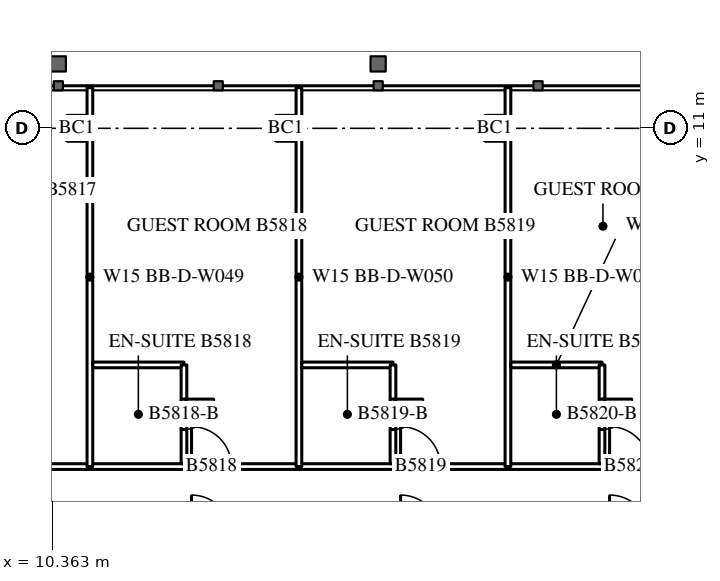
"""IFC4 building model, lengths in metres.
Left out: names, types, materials, properties, quantities, classifications, styles, units other than length and angle.
Written with IfcOpenShell. Run it as: python <this file> out.ifc"""

import sys

from ifc_helpers import new_model, si_unit, direction, frame, frame_2d, origin, origin_2d, place, context, subcontext, project, spatial, rectangle, i_section, extrude, element, fill, save


model = new_model("IFC4")
c1 = context("Model", 3, precision=1e-05, world=origin(), true_north=direction((0.0, 1.0)))
c2 = subcontext(c1, "Body", "Model", "MODEL_VIEW")
j1 = project(units=[si_unit("LENGTHUNIT", "METRE"), si_unit("PLANEANGLEUNIT", "RADIAN")], contexts=[c1])
p1 = place(None, origin())
s1 = spatial("IfcSite", under=j1, at=p1, CompositionType="ELEMENT")
p2 = place(p1, origin())
s2 = spatial("IfcBuilding", under=s1, at=p2, CompositionType="ELEMENT")
p3 = place(p2, frame((0.0, 0.0, 218.9)))
s3 = spatial("IfcBuildingStorey", under=s2, at=p3, CompositionType="ELEMENT", Elevation=218.9)
for number, where, z_axis, x_axis in (
    (1, (11.0, 11.0, 0.0), (0.0, 0.0, 1.0), (1.0, 0.0, 0.0)),
    (2, (16.5, 11.0, 0.0), (0.0, 0.0, 1.0), (1.0, 0.0, 0.0)),
    (3, (22.0, 11.0, 0.0), (0.0, 0.0, 1.0), (1.0, 0.0, 0.0)),
):
    element("IfcColumn", number, at=place(p3, frame(where, z_axis=z_axis, x_axis=x_axis)), inside=s3, PredefinedType="COLUMN", context=c2, shape_type="SweptSolid", body=[
        extrude(i_section(OverallWidth=0.476, OverallDepth=0.6, WebThickness=0.1, FlangeThickness=0.14, FilletRadius=0.02, at=origin_2d()), origin(), (0.0, 0.0, 1.0), 3.6),
    ])
p4 = place(p3, frame((-27.5, 2.1, 0.0), z_axis=(0.0, 0.0, 1.0), x_axis=(1.0, 0.0, 0.0)))
e4 = element("IfcWall", 4, at=p4, inside=s3, PredefinedType="PARTITIONING", context=c2, shape_type="SweptSolid", body=[
    extrude(rectangle(XDim=55.0, YDim=0.15, at=frame_2d((27.5, 0.0))), origin(), (0.0, 0.0, 1.0), 3.4),
])
p5 = place(p4, frame((2.025, 0.0, 0.0)))
e5 = element("IfcOpeningElement", 5, at=p5, cuts=e4, PredefinedType="OPENING", context=c2, shape_type="SweptSolid", body=[
    extrude(rectangle(XDim=1.05, YDim=2.4, at=frame_2d((0.525, 1.2))), frame((0.0, 0.085, 0.0), z_axis=(0.0, -1.0, 0.0), x_axis=(1.0, 0.0, 0.0)), (0.0, 0.0, 1.0), 0.17),
])
p6 = place(p4, frame((8.525, 0.0, 0.0)))
e6 = element("IfcOpeningElement", 6, at=p6, cuts=e4, PredefinedType="OPENING", context=c2, shape_type="SweptSolid", body=[
    extrude(rectangle(XDim=1.05, YDim=2.4, at=frame_2d((0.525, 1.2))), frame((0.0, 0.085, 0.0), z_axis=(0.0, -1.0, 0.0), x_axis=(1.0, 0.0, 0.0)), (0.0, 0.0, 1.0), 0.17),
])
p7 = place(p4, frame((14.025, 0.0, 0.0)))
e7 = element("IfcOpeningElement", 7, at=p7, cuts=e4, PredefinedType="OPENING", context=c2, shape_type="SweptSolid", body=[
    extrude(rectangle(XDim=1.05, YDim=2.4, at=frame_2d((0.525, 1.2))), frame((0.0, 0.085, 0.0), z_axis=(0.0, -1.0, 0.0), x_axis=(1.0, 0.0, 0.0)), (0.0, 0.0, 1.0), 0.17),
])
p8 = place(p4, frame((19.525, 0.0, 0.0)))
e8 = element("IfcOpeningElement", 8, at=p8, cuts=e4, PredefinedType="OPENING", context=c2, shape_type="SweptSolid", body=[
    extrude(rectangle(XDim=1.05, YDim=2.4, at=frame_2d((0.525, 1.2))), frame((0.0, 0.085, 0.0), z_axis=(0.0, -1.0, 0.0), x_axis=(1.0, 0.0, 0.0)), (0.0, 0.0, 1.0), 0.17),
])
p9 = place(p4, frame((25.025, 0.0, 0.0)))
e9 = element("IfcOpeningElement", 9, at=p9, cuts=e4, PredefinedType="OPENING", context=c2, shape_type="SweptSolid", body=[
    extrude(rectangle(XDim=1.05, YDim=2.4, at=frame_2d((0.525, 1.2))), frame((0.0, 0.085, 0.0), z_axis=(0.0, -1.0, 0.0), x_axis=(1.0, 0.0, 0.0)), (0.0, 0.0, 1.0), 0.17),
])
p10 = place(p4, frame((30.525, 0.0, 0.0)))
e10 = element("IfcOpeningElement", 10, at=p10, cuts=e4, PredefinedType="OPENING", context=c2, shape_type="SweptSolid", body=[
    extrude(rectangle(XDim=1.05, YDim=2.4, at=frame_2d((0.525, 1.2))), frame((0.0, 0.085, 0.0), z_axis=(0.0, -1.0, 0.0), x_axis=(1.0, 0.0, 0.0)), (0.0, 0.0, 1.0), 0.17),
])
p11 = place(p4, frame((36.025, 0.0, 0.0)))
e11 = element("IfcOpeningElement", 11, at=p11, cuts=e4, PredefinedType="OPENING", context=c2, shape_type="SweptSolid", body=[
    extrude(rectangle(XDim=1.05, YDim=2.4, at=frame_2d((0.525, 1.2))), frame((0.0, 0.085, 0.0), z_axis=(0.0, -1.0, 0.0), x_axis=(1.0, 0.0, 0.0)), (0.0, 0.0, 1.0), 0.17),
])
p12 = place(p4, frame((41.525, 0.0, 0.0)))
e12 = element("IfcOpeningElement", 12, at=p12, cuts=e4, PredefinedType="OPENING", context=c2, shape_type="SweptSolid", body=[
    extrude(rectangle(XDim=1.05, YDim=2.4, at=frame_2d((0.525, 1.2))), frame((0.0, 0.085, 0.0), z_axis=(0.0, -1.0, 0.0), x_axis=(1.0, 0.0, 0.0)), (0.0, 0.0, 1.0), 0.17),
])
p13 = place(p4, frame((47.025, 0.0, 0.0)))
e13 = element("IfcOpeningElement", 13, at=p13, cuts=e4, PredefinedType="OPENING", context=c2, shape_type="SweptSolid", body=[
    extrude(rectangle(XDim=1.05, YDim=2.4, at=frame_2d((0.525, 1.2))), frame((0.0, 0.085, 0.0), z_axis=(0.0, -1.0, 0.0), x_axis=(1.0, 0.0, 0.0)), (0.0, 0.0, 1.0), 0.17),
])
p14 = place(p4, frame((52.525, 0.0, 0.0)))
e14 = element("IfcOpeningElement", 14, at=p14, cuts=e4, PredefinedType="OPENING", context=c2, shape_type="SweptSolid", body=[
    extrude(rectangle(XDim=1.05, YDim=2.4, at=frame_2d((0.525, 1.2))), frame((0.0, 0.085, 0.0), z_axis=(0.0, -1.0, 0.0), x_axis=(1.0, 0.0, 0.0)), (0.0, 0.0, 1.0), 0.17),
])
for number, where, z_axis, x_axis in (
    (15, (11.35, 2.1, 0.0), (0.0, 0.0, 1.0), (0.0, 1.0, 0.0)),
    (16, (16.85, 2.1, 0.0), (0.0, 0.0, 1.0), (0.0, 1.0, 0.0)),
    (17, (22.35, 2.1, 0.0), (0.0, 0.0, 1.0), (0.0, 1.0, 0.0)),
):
    element("IfcWall", number, at=place(p3, frame(where, z_axis=z_axis, x_axis=x_axis)), inside=s3, PredefinedType="PARTITIONING", context=c2, shape_type="SweptSolid", body=[
        extrude(rectangle(XDim=9.97, YDim=0.15, at=frame_2d((4.985, 0.0))), origin(), (0.0, 0.0, 1.0), 3.4),
    ])
p15 = place(p3, frame((11.425, 4.775, 0.0), z_axis=(0.0, 0.0, 1.0), x_axis=(1.0, 0.0, 0.0)))
e18 = element("IfcWall", 18, at=p15, inside=s3, PredefinedType="PARTITIONING", context=c2, shape_type="SweptSolid", body=[
    extrude(rectangle(XDim=2.4, YDim=0.15, at=frame_2d((1.2, 0.0))), origin(), (0.0, 0.0, 1.0), 3.4),
])
p16 = place(p3, frame((13.825, 2.175, 0.0), z_axis=(0.0, 0.0, 1.0), x_axis=(0.0, 1.0, 0.0)))
e19 = element("IfcWall", 19, at=p16, inside=s3, PredefinedType="PARTITIONING", context=c2, shape_type="SweptSolid", body=[
    extrude(rectangle(XDim=2.6, YDim=0.15, at=frame_2d((1.3, 0.0))), origin(), (0.0, 0.0, 1.0), 3.4),
])
p17 = place(p16, frame((0.9, 0.0, 0.0)))
e20 = element("IfcOpeningElement", 20, at=p17, cuts=e19, PredefinedType="OPENING", context=c2, shape_type="SweptSolid", body=[
    extrude(rectangle(XDim=0.8, YDim=2.2, at=frame_2d((0.4, 1.1))), frame((0.0, 0.085, 0.0), z_axis=(0.0, -1.0, 0.0), x_axis=(1.0, 0.0, 0.0)), (0.0, 0.0, 1.0), 0.17),
])
p18 = place(p3, frame((16.925, 4.775, 0.0), z_axis=(0.0, 0.0, 1.0), x_axis=(1.0, 0.0, 0.0)))
e21 = element("IfcWall", 21, at=p18, inside=s3, PredefinedType="PARTITIONING", context=c2, shape_type="SweptSolid", body=[
    extrude(rectangle(XDim=2.4, YDim=0.15, at=frame_2d((1.2, 0.0))), origin(), (0.0, 0.0, 1.0), 3.4),
])
p19 = place(p3, frame((19.325, 2.175, 0.0), z_axis=(0.0, 0.0, 1.0), x_axis=(0.0, 1.0, 0.0)))
e22 = element("IfcWall", 22, at=p19, inside=s3, PredefinedType="PARTITIONING", context=c2, shape_type="SweptSolid", body=[
    extrude(rectangle(XDim=2.6, YDim=0.15, at=frame_2d((1.3, 0.0))), origin(), (0.0, 0.0, 1.0), 3.4),
])
p20 = place(p19, frame((0.9, 0.0, 0.0)))
e23 = element("IfcOpeningElement", 23, at=p20, cuts=e22, PredefinedType="OPENING", context=c2, shape_type="SweptSolid", body=[
    extrude(rectangle(XDim=0.8, YDim=2.2, at=frame_2d((0.4, 1.1))), frame((0.0, 0.085, 0.0), z_axis=(0.0, -1.0, 0.0), x_axis=(1.0, 0.0, 0.0)), (0.0, 0.0, 1.0), 0.17),
])
p21 = place(p3, frame((22.425, 4.775, 0.0), z_axis=(0.0, 0.0, 1.0), x_axis=(1.0, 0.0, 0.0)))
e24 = element("IfcWall", 24, at=p21, inside=s3, PredefinedType="PARTITIONING", context=c2, shape_type="SweptSolid", body=[
    extrude(rectangle(XDim=2.4, YDim=0.15, at=frame_2d((1.2, 0.0))), origin(), (0.0, 0.0, 1.0), 3.4),
])
p22 = place(p3, frame((24.825, 2.175, 0.0), z_axis=(0.0, 0.0, 1.0), x_axis=(0.0, 1.0, 0.0)))
e25 = element("IfcWall", 25, at=p22, inside=s3, PredefinedType="PARTITIONING", context=c2, shape_type="SweptSolid", body=[
    extrude(rectangle(XDim=2.6, YDim=0.15, at=frame_2d((1.3, 0.0))), origin(), (0.0, 0.0, 1.0), 3.4),
])
p23 = place(p22, frame((0.9, 0.0, 0.0)))
e26 = element("IfcOpeningElement", 26, at=p23, cuts=e25, PredefinedType="OPENING", context=c2, shape_type="SweptSolid", body=[
    extrude(rectangle(XDim=0.8, YDim=2.2, at=frame_2d((0.4, 1.1))), frame((0.0, 0.085, 0.0), z_axis=(0.0, -1.0, 0.0), x_axis=(1.0, 0.0, 0.0)), (0.0, 0.0, 1.0), 0.17),
])
p24 = place(p17, origin())
e27 = element("IfcDoor", 27, at=p24, inside=s3, OperationType="SINGLE_SWING_RIGHT", PredefinedType="DOOR", context=c2, shape_type="SweptSolid", body=[
    extrude(rectangle(XDim=0.8, YDim=2.2, at=frame_2d((0.4, 1.1))), frame((0.0, 0.025, 0.0), z_axis=(0.0, -1.0, 0.0), x_axis=(1.0, 0.0, 0.0)), (0.0, 0.0, 1.0), 0.05),
])
fill(e20, e27)
p25 = place(p12, origin())
e28 = element("IfcDoor", 28, at=p25, inside=s3, OperationType="SINGLE_SWING_LEFT", PredefinedType="DOOR", context=c2, shape_type="SweptSolid", body=[
    extrude(rectangle(XDim=1.05, YDim=2.4, at=frame_2d((0.525, 1.2))), frame((0.0, 0.025, 0.0), z_axis=(0.0, -1.0, 0.0), x_axis=(1.0, 0.0, 0.0)), (0.0, 0.0, 1.0), 0.05),
])
fill(e12, e28)
p26 = place(p20, origin())
e29 = element("IfcDoor", 29, at=p26, inside=s3, OperationType="SINGLE_SWING_RIGHT", PredefinedType="DOOR", context=c2, shape_type="SweptSolid", body=[
    extrude(rectangle(XDim=0.8, YDim=2.2, at=frame_2d((0.4, 1.1))), frame((0.0, 0.025, 0.0), z_axis=(0.0, -1.0, 0.0), x_axis=(1.0, 0.0, 0.0)), (0.0, 0.0, 1.0), 0.05),
])
fill(e23, e29)
p27 = place(p13, origin())
e30 = element("IfcDoor", 30, at=p27, inside=s3, OperationType="SINGLE_SWING_LEFT", PredefinedType="DOOR", context=c2, shape_type="SweptSolid", body=[
    extrude(rectangle(XDim=1.05, YDim=2.4, at=frame_2d((0.525, 1.2))), frame((0.0, 0.025, 0.0), z_axis=(0.0, -1.0, 0.0), x_axis=(1.0, 0.0, 0.0)), (0.0, 0.0, 1.0), 0.05),
])
fill(e13, e30)
p28 = place(p23, origin())
e31 = element("IfcDoor", 31, at=p28, inside=s3, OperationType="SINGLE_SWING_RIGHT", PredefinedType="DOOR", context=c2, shape_type="SweptSolid", body=[
    extrude(rectangle(XDim=0.8, YDim=2.2, at=frame_2d((0.4, 1.1))), frame((0.0, 0.025, 0.0), z_axis=(0.0, -1.0, 0.0), x_axis=(1.0, 0.0, 0.0)), (0.0, 0.0, 1.0), 0.05),
])
fill(e26, e31)
p29 = place(p14, origin())
e32 = element("IfcDoor", 32, at=p29, inside=s3, OperationType="SINGLE_SWING_LEFT", PredefinedType="DOOR", context=c2, shape_type="SweptSolid", body=[
    extrude(rectangle(XDim=1.05, YDim=2.4, at=frame_2d((0.525, 1.2))), frame((0.0, 0.025, 0.0), z_axis=(0.0, -1.0, 0.0), x_axis=(1.0, 0.0, 0.0)), (0.0, 0.0, 1.0), 0.05),
])
fill(e14, e32)
save(model, sys.argv[1])
